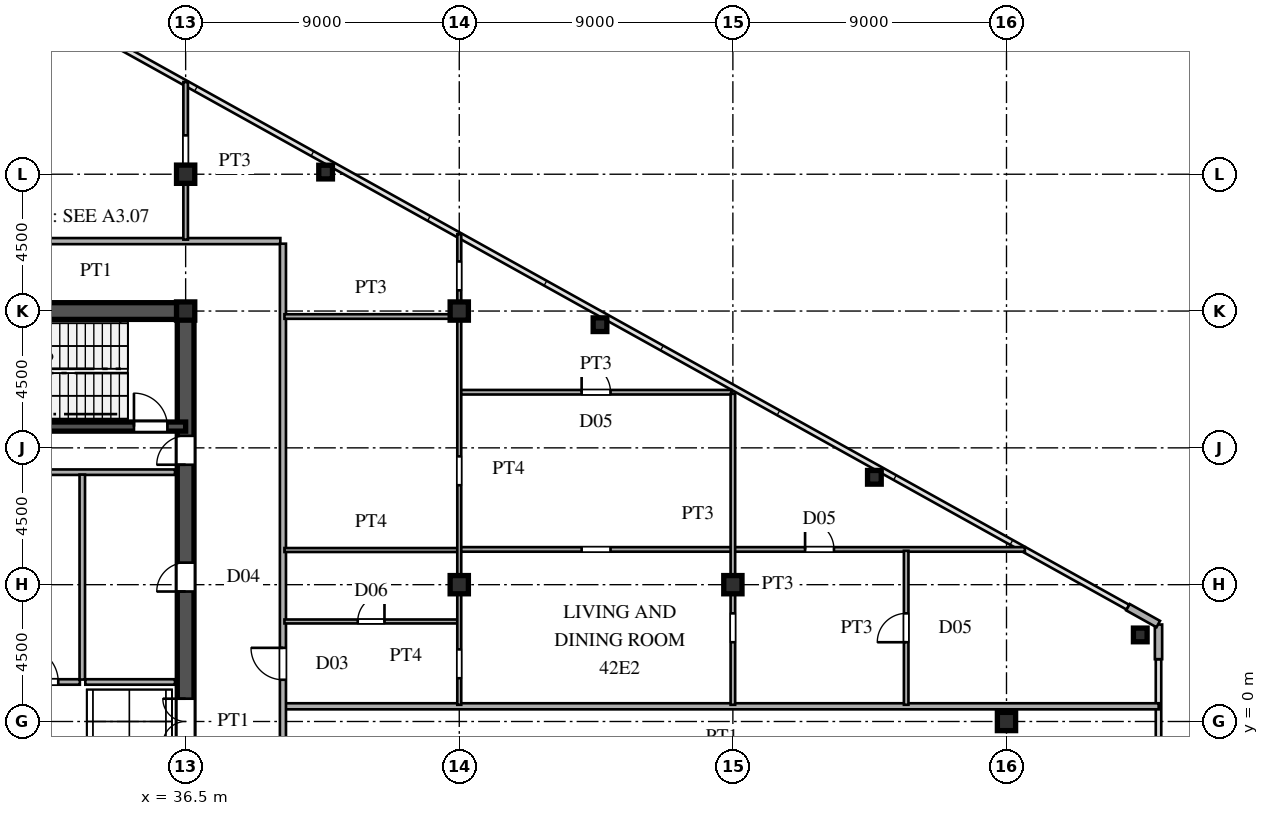
"""IFC4 building model, lengths in metres.
Left out: names, types, materials, properties, quantities, classifications, styles, units other than length and angle.
Written with IfcOpenShell. Run it as: python <this file> out.ifc"""

import sys

from ifc_helpers import new_model, si_unit, direction, frame, frame_2d, origin, origin_2d, place, context, subcontext, project, spatial, rectangle, hollow_rectangle, i_section, extrude, source, transform, mapped, element, fill, save


model = new_model("IFC4")
c1 = context("Model", 3, precision=1e-05, world=origin(), true_north=direction((0.0, 1.0)))
c2 = subcontext(c1, "Body", "Model", "MODEL_VIEW")
j1 = project(units=[si_unit("LENGTHUNIT", "METRE"), si_unit("PLANEANGLEUNIT", "RADIAN")], contexts=[c1])
p1 = place(None, origin())
s1 = spatial("IfcSite", under=j1, at=p1, CompositionType="ELEMENT")
p2 = place(p1, origin())
s2 = spatial("IfcBuilding", under=s1, at=p2, CompositionType="ELEMENT")
p3 = place(p2, frame((0.0, 0.0, 158.4)))
s3 = spatial("IfcBuildingStorey", under=s2, at=p3, CompositionType="ELEMENT", Elevation=158.4)
m1 = source(origin(), c2, "Body", "SweptSolid", [
    extrude(i_section(OverallWidth=0.6, OverallDepth=0.6, WebThickness=0.025, FlangeThickness=0.04, at=origin_2d()), origin(), (0.0, 0.0, 1.0), 3.6),
])
for number, where, z_axis, x_axis in (
    (1, (36.5, 13.5, 0.0), (0.0, 0.0, 1.0), (1.0, 0.0, 0.0)),
    (2, (36.5, 18.0, 0.0), (0.0, 0.0, 1.0), (1.0, 0.0, 0.0)),
    (3, (45.5, 4.5, 0.0), (0.0, 0.0, 1.0), (1.0, 0.0, 0.0)),
    (4, (45.5, 13.5, 0.0), (0.0, 0.0, 1.0), (1.0, 0.0, 0.0)),
    (5, (54.5, 4.5, 0.0), (0.0, 0.0, 1.0), (1.0, 0.0, 0.0)),
    (6, (63.5, 0.0, 0.0), (0.0, 0.0, 1.0), (1.0, 0.0, 0.0)),
):
    element("IfcColumn", number, at=place(p3, frame(where, z_axis=z_axis, x_axis=x_axis)), inside=s3, PredefinedType="COLUMN", context=c2, shape_type="MappedRepresentation", body=[
        mapped(m1, transform((0.0, 0.0, 0.0), scale=1.0)),
    ])
m2 = source(origin(), c2, "Body", "SweptSolid", [
    extrude(hollow_rectangle(XDim=0.45, YDim=0.45, WallThickness=0.018, at=origin_2d()), origin(), (0.0, 0.0, 1.0), 3.6),
])
for number, where, z_axis, x_axis in (
    (7, (67.9, 2.847, 0.0), (0.0, 0.0, 1.0), (1.0, 0.0, 0.0)),
    (8, (41.104, 18.071, 0.0), (0.0, 0.0, 1.0), (1.0, 0.0, 0.0)),
    (9, (50.129, 13.051, 0.0), (0.0, 0.0, 1.0), (1.0, 0.0, 0.0)),
    (10, (59.155, 8.031, 0.0), (0.0, 0.0, 1.0), (1.0, 0.0, 0.0)),
):
    element("IfcColumn", number, at=place(p3, frame(where, z_axis=z_axis, x_axis=x_axis)), inside=s3, PredefinedType="COLUMN", context=c2, shape_type="MappedRepresentation", body=[
        mapped(m2, transform((0.0, 0.0, 0.0), scale=1.0)),
    ])
for number, where, z_axis, x_axis in (
    (11, (68.5, 2.05, 0.0), (0.0, 0.0, 1.0), (0.0, 1.0, 0.0)),
    (12, (68.491, 3.205, 0.0), (0.0, 0.0, 1.0), (-0.874, 0.486, 0.0)),
):
    element("IfcWall", number, at=place(p3, frame(where, z_axis=z_axis, x_axis=x_axis)), inside=s3, PredefinedType="SOLIDWALL", context=c2, shape_type="SweptSolid", body=[
        extrude(rectangle(XDim=1.14, YDim=0.24, at=frame_2d((0.57, 0.0))), origin(), (0.0, 0.0, 1.0), 3.34),
    ])
p4 = place(p3, frame((27.5, 13.5, 0.0), z_axis=(0.0, 0.0, 1.0), x_axis=(1.0, 0.0, 0.0)))
e13 = element("IfcWall", 13, at=p4, inside=s3, PredefinedType="SHEAR", context=c2, shape_type="SweptSolid", body=[
    extrude(rectangle(XDim=9.0, YDim=0.55, at=frame_2d((4.5, 0.0))), origin(), (0.0, 0.0, 1.0), 3.34),
])
p5 = place(p3, frame((36.5, -1.3, 0.0), z_axis=(0.0, 0.0, 1.0), x_axis=(0.0, 1.0, 0.0)))
e14 = element("IfcWall", 14, at=p5, inside=s3, PredefinedType="SHEAR", context=c2, shape_type="SweptSolid", body=[
    extrude(rectangle(XDim=2.6, YDim=0.55, at=frame_2d((1.3, 0.0))), origin(), (0.0, 0.0, 1.0), 3.34),
])
p6 = place(p5, frame((0.55, 0.0, 0.0)))
e15 = element("IfcOpeningElement", 15, at=p6, cuts=e14, PredefinedType="OPENING", context=c2, shape_type="SweptSolid", body=[
    extrude(rectangle(XDim=1.5, YDim=2.3, at=frame_2d((0.75, 1.15))), frame((0.0, 0.285, 0.0), z_axis=(0.0, -1.0, 0.0), x_axis=(1.0, 0.0, 0.0)), (0.0, 0.0, 1.0), 0.57),
])
p7 = place(p3, frame((36.5, 8.2, 0.0), z_axis=(0.0, 0.0, 1.0), x_axis=(0.0, 1.0, 0.0)))
e16 = element("IfcWall", 16, at=p7, inside=s3, PredefinedType="SHEAR", context=c2, shape_type="SweptSolid", body=[
    extrude(rectangle(XDim=5.45, YDim=0.55, at=frame_2d((2.725, 0.0))), origin(), (0.0, 0.0, 1.0), 3.34),
])
p8 = place(p7, frame((0.245, 0.0, 0.0)))
e17 = element("IfcOpeningElement", 17, at=p8, cuts=e16, PredefinedType="OPENING", context=c2, shape_type="SweptSolid", body=[
    extrude(rectangle(XDim=0.95, YDim=2.15, at=frame_2d((0.475, 1.075))), frame((0.0, 0.285, 0.0), z_axis=(0.0, -1.0, 0.0), x_axis=(1.0, 0.0, 0.0)), (0.0, 0.0, 1.0), 0.57),
])
p9 = place(p3, frame((36.5, 1.3, 0.0), z_axis=(0.0, 0.0, 1.0), x_axis=(0.0, 1.0, 0.0)))
e18 = element("IfcWall", 18, at=p9, inside=s3, PredefinedType="SHEAR", context=c2, shape_type="SweptSolid", body=[
    extrude(rectangle(XDim=6.9, YDim=0.55, at=frame_2d((3.45, 0.0))), origin(), (0.0, 0.0, 1.0), 3.34),
])
p10 = place(p9, frame((2.975, 0.0, 0.0)))
e19 = element("IfcOpeningElement", 19, at=p10, cuts=e18, PredefinedType="OPENING", context=c2, shape_type="SweptSolid", body=[
    extrude(rectangle(XDim=0.95, YDim=2.15, at=frame_2d((0.475, 1.075))), frame((0.0, 0.285, 0.0), z_axis=(0.0, -1.0, 0.0), x_axis=(1.0, 0.0, 0.0)), (0.0, 0.0, 1.0), 0.57),
])
p11 = place(p3, frame((27.5, 9.7, 0.0), z_axis=(0.0, 0.0, 1.0), x_axis=(1.0, 0.0, 0.0)))
e20 = element("IfcWall", 20, at=p11, inside=s3, PredefinedType="SHEAR", context=c2, shape_type="SweptSolid", body=[
    extrude(rectangle(XDim=9.0, YDim=0.3, at=frame_2d((4.5, 0.0))), origin(), (0.0, 0.0, 1.0), 3.34),
])
p12 = place(p11, frame((7.3, 0.0, 0.0)))
e21 = element("IfcOpeningElement", 21, at=p12, cuts=e20, PredefinedType="OPENING", context=c2, shape_type="SweptSolid", body=[
    extrude(rectangle(XDim=1.1, YDim=2.2, at=frame_2d((0.55, 1.1))), frame((0.0, 0.16, 0.0), z_axis=(0.0, -1.0, 0.0), x_axis=(1.0, 0.0, 0.0)), (0.0, 0.0, 1.0), 0.32),
])
p13 = place(p3, frame((30.45, 8.2, 0.0), z_axis=(0.0, 0.0, 1.0), x_axis=(1.0, 0.0, 0.0)))
e22 = element("IfcWall", 22, at=p13, inside=s3, PredefinedType="PARTITIONING", context=c2, shape_type="SweptSolid", body=[
    extrude(rectangle(XDim=5.7, YDim=0.18, at=frame_2d((2.85, 0.0))), origin(), (0.0, 0.0, 1.0), 3.34),
])
p14 = place(p3, frame((33.1, 1.38, 0.0), z_axis=(0.0, 0.0, 1.0), x_axis=(0.0, 1.0, 0.0)))
e23 = element("IfcWall", 23, at=p14, inside=s3, PredefinedType="PARTITIONING", context=c2, shape_type="SweptSolid", body=[
    extrude(rectangle(XDim=6.74, YDim=0.18, at=frame_2d((3.37, 0.0))), origin(), (0.0, 0.0, 1.0), 3.34),
])
p15 = place(p3, frame((30.45, 1.3, 0.0), z_axis=(0.0, 0.0, 1.0), x_axis=(1.0, 0.0, 0.0)))
e24 = element("IfcWall", 24, at=p15, inside=s3, PredefinedType="PARTITIONING", context=c2, shape_type="SweptSolid", body=[
    extrude(rectangle(XDim=2.57, YDim=0.18, at=frame_2d((1.285, 0.0))), origin(), (0.0, 0.0, 1.0), 3.34),
])
p16 = place(p15, frame((0.71, 0.0, 0.0)))
e25 = element("IfcOpeningElement", 25, at=p16, cuts=e24, PredefinedType="OPENING", context=c2, shape_type="SweptSolid", body=[
    extrude(rectangle(XDim=1.15, YDim=2.2, at=frame_2d((0.575, 1.1))), frame((0.0, 0.1, 0.0), z_axis=(0.0, -1.0, 0.0), x_axis=(1.0, 0.0, 0.0)), (0.0, 0.0, 1.0), 0.2),
])
p17 = place(p3, frame((33.2, 1.3, 0.0), z_axis=(0.0, 0.0, 1.0), x_axis=(1.0, 0.0, 0.0)))
e26 = element("IfcWall", 26, at=p17, inside=s3, PredefinedType="PARTITIONING", context=c2, shape_type="SweptSolid", body=[
    extrude(rectangle(XDim=2.95, YDim=0.18, at=frame_2d((1.475, 0.0))), origin(), (0.0, 0.0, 1.0), 3.34),
])
p18 = place(p3, frame((39.78, 0.5, 0.0), z_axis=(0.0, 0.0, 1.0), x_axis=(1.0, 0.0, 0.0)))
e27 = element("IfcWall", 27, at=p18, inside=s3, PredefinedType="PARTITIONING", context=c2, shape_type="SweptSolid", body=[
    extrude(rectangle(XDim=28.725, YDim=0.2, at=frame_2d((14.362, 0.0))), origin(), (0.0, 0.0, 1.0), 3.34),
])
p19 = place(p3, frame((39.75, 3.29, 0.0), z_axis=(0.0, 0.0, 1.0), x_axis=(1.0, 0.0, 0.0)))
e28 = element("IfcWall", 28, at=p19, inside=s3, PredefinedType="PARTITIONING", context=c2, shape_type="SweptSolid", body=[
    extrude(rectangle(XDim=5.7, YDim=0.13, at=frame_2d((2.85, 0.0))), origin(), (0.0, 0.0, 1.0), 3.34),
])
p20 = place(p19, frame((2.41, 0.0, 0.0)))
e29 = element("IfcOpeningElement", 29, at=p20, cuts=e28, PredefinedType="OPENING", context=c2, shape_type="SweptSolid", body=[
    extrude(rectangle(XDim=0.88, YDim=2.1, at=frame_2d((0.44, 1.05))), frame((0.0, 0.075, 0.0), z_axis=(0.0, -1.0, 0.0), x_axis=(1.0, 0.0, 0.0)), (0.0, 0.0, 1.0), 0.15),
])
p21 = place(p3, frame((39.75, 5.64, 0.0), z_axis=(0.0, 0.0, 1.0), x_axis=(1.0, 0.0, 0.0)))
e30 = element("IfcWall", 30, at=p21, inside=s3, PredefinedType="PARTITIONING", context=c2, shape_type="SweptSolid", body=[
    extrude(rectangle(XDim=5.7, YDim=0.13, at=frame_2d((2.85, 0.0))), origin(), (0.0, 0.0, 1.0), 3.34),
])
p22 = place(p3, frame((45.55, 5.66, 0.0), z_axis=(0.0, 0.0, 1.0), x_axis=(1.0, 0.0, 0.0)))
e31 = element("IfcWall", 31, at=p22, inside=s3, PredefinedType="PARTITIONING", context=c2, shape_type="SweptSolid", body=[
    extrude(rectangle(XDim=18.555, YDim=0.15, at=frame_2d((9.277, 0.0))), origin(), (0.0, 0.0, 1.0), 3.34),
])
p23 = place(p22, frame((3.975, 0.0, 0.0)))
e32 = element("IfcOpeningElement", 32, at=p23, cuts=e31, PredefinedType="OPENING", context=c2, shape_type="SweptSolid", body=[
    extrude(rectangle(XDim=0.95, YDim=2.15, at=frame_2d((0.475, 1.075))), frame((0.0, 0.085, 0.0), z_axis=(0.0, -1.0, 0.0), x_axis=(1.0, 0.0, 0.0)), (0.0, 0.0, 1.0), 0.17),
])
p24 = place(p22, frame((11.325, 0.0, 0.0)))
e33 = element("IfcOpeningElement", 33, at=p24, cuts=e31, PredefinedType="OPENING", context=c2, shape_type="SweptSolid", body=[
    extrude(rectangle(XDim=0.95, YDim=2.15, at=frame_2d((0.475, 1.075))), frame((0.0, 0.085, 0.0), z_axis=(0.0, -1.0, 0.0), x_axis=(1.0, 0.0, 0.0)), (0.0, 0.0, 1.0), 0.17),
])
p25 = place(p3, frame((45.55, 10.83, 0.0), z_axis=(0.0, 0.0, 1.0), x_axis=(1.0, 0.0, 0.0)))
e34 = element("IfcWall", 34, at=p25, inside=s3, PredefinedType="PARTITIONING", context=c2, shape_type="SweptSolid", body=[
    extrude(rectangle(XDim=8.9, YDim=0.15, at=frame_2d((4.45, 0.0))), origin(), (0.0, 0.0, 1.0), 3.34),
])
p26 = place(p25, frame((3.975, 0.0, 0.0)))
e35 = element("IfcOpeningElement", 35, at=p26, cuts=e34, PredefinedType="OPENING", context=c2, shape_type="SweptSolid", body=[
    extrude(rectangle(XDim=0.95, YDim=2.15, at=frame_2d((0.475, 1.075))), frame((0.0, 0.085, 0.0), z_axis=(0.0, -1.0, 0.0), x_axis=(1.0, 0.0, 0.0)), (0.0, 0.0, 1.0), 0.17),
])
p27 = place(p3, frame((39.75, 13.32, 0.0), z_axis=(0.0, 0.0, 1.0), x_axis=(1.0, 0.0, 0.0)))
e36 = element("IfcWall", 36, at=p27, inside=s3, PredefinedType="PARTITIONING", context=c2, shape_type="SweptSolid", body=[
    extrude(rectangle(XDim=5.7, YDim=0.15, at=frame_2d((2.85, 0.0))), origin(), (0.0, 0.0, 1.0), 3.34),
])
p28 = place(p3, frame((27.5, 15.8, 0.0), z_axis=(0.0, 0.0, 1.0), x_axis=(1.0, 0.0, 0.0)))
e37 = element("IfcWall", 37, at=p28, inside=s3, PredefinedType="PARTITIONING", context=c2, shape_type="SweptSolid", body=[
    extrude(rectangle(XDim=12.115, YDim=0.2, at=frame_2d((6.058, 0.0))), origin(), (0.0, 0.0, 1.0), 3.34),
])
p29 = place(p3, frame((36.5, 15.85, 0.0), z_axis=(0.0, 0.0, 1.0), x_axis=(0.0, 1.0, 0.0)))
e38 = element("IfcWall", 38, at=p29, inside=s3, PredefinedType="PARTITIONING", context=c2, shape_type="SweptSolid", body=[
    extrude(rectangle(XDim=2.17, YDim=0.15, at=frame_2d((1.085, 0.0))), origin(), (0.0, 0.0, 1.0), 2.44),
])
p30 = place(p3, frame((36.5, 18.02, 0.0), z_axis=(0.0, 0.0, 1.0), x_axis=(0.0, 1.0, 0.0)))
e39 = element("IfcWall", 39, at=p30, inside=s3, PredefinedType="PARTITIONING", context=c2, shape_type="SweptSolid", body=[
    extrude(rectangle(XDim=3.012, YDim=0.15, at=frame_2d((1.506, 0.0))), origin(), (0.0, 0.0, 1.0), 3.34),
])
p31 = place(p30, frame((0.308, 0.0, 0.0)))
e40 = element("IfcOpeningElement", 40, at=p31, cuts=e39, PredefinedType="OPENING", context=c2, shape_type="SweptSolid", body=[
    extrude(rectangle(XDim=0.95, YDim=2.15, at=frame_2d((0.475, 1.075))), frame((0.0, 0.085, 0.0), z_axis=(0.0, -1.0, 0.0), x_axis=(1.0, 0.0, 0.0)), (0.0, 0.0, 1.0), 0.17),
])
p32 = place(p3, frame((39.7, -15.715, 0.0), z_axis=(0.0, 0.0, 1.0), x_axis=(0.0, 1.0, 0.0)))
e41 = element("IfcWall", 41, at=p32, inside=s3, PredefinedType="PARTITIONING", context=c2, shape_type="SweptSolid", body=[
    extrude(rectangle(XDim=31.43, YDim=0.2, at=frame_2d((15.715, 0.0))), origin(), (0.0, 0.0, 1.0), 3.34),
])
p33 = place(p32, frame((7.54, 0.0, 0.0)))
e42 = element("IfcOpeningElement", 42, at=p33, cuts=e41, PredefinedType="OPENING", context=c2, shape_type="SweptSolid", body=[
    extrude(rectangle(XDim=1.05, YDim=2.25, at=frame_2d((0.525, 1.125))), frame((0.0, 0.11, 0.0), z_axis=(0.0, -1.0, 0.0), x_axis=(1.0, 0.0, 0.0)), (0.0, 0.0, 1.0), 0.22),
])
p34 = place(p32, frame((17.087, 0.0, 0.0)))
e43 = element("IfcOpeningElement", 43, at=p34, cuts=e41, PredefinedType="OPENING", context=c2, shape_type="SweptSolid", body=[
    extrude(rectangle(XDim=1.05, YDim=2.25, at=frame_2d((0.525, 1.125))), frame((0.0, 0.11, 0.0), z_axis=(0.0, -1.0, 0.0), x_axis=(1.0, 0.0, 0.0)), (0.0, 0.0, 1.0), 0.22),
])
p35 = place(p3, frame((45.5, 0.55, 0.0), z_axis=(0.0, 0.0, 1.0), x_axis=(0.0, 1.0, 0.0)))
e44 = element("IfcWall", 44, at=p35, inside=s3, PredefinedType="PARTITIONING", context=c2, shape_type="SweptSolid", body=[
    extrude(rectangle(XDim=12.97, YDim=0.13, at=frame_2d((6.485, 0.0))), origin(), (0.0, 0.0, 1.0), 2.44),
])
p36 = place(p35, frame((0.873, 0.0, 0.0)))
e45 = element("IfcOpeningElement", 45, at=p36, cuts=e44, PredefinedType="OPENING", context=c2, shape_type="SweptSolid", body=[
    extrude(rectangle(XDim=0.95, YDim=2.15, at=frame_2d((0.475, 1.075))), frame((0.0, 0.075, 0.0), z_axis=(0.0, -1.0, 0.0), x_axis=(1.0, 0.0, 0.0)), (0.0, 0.0, 1.0), 0.15),
])
p37 = place(p35, frame((7.221, 0.0, 0.0)))
e46 = element("IfcOpeningElement", 46, at=p37, cuts=e44, PredefinedType="OPENING", context=c2, shape_type="SweptSolid", body=[
    extrude(rectangle(XDim=0.95, YDim=2.15, at=frame_2d((0.475, 1.075))), frame((0.0, 0.075, 0.0), z_axis=(0.0, -1.0, 0.0), x_axis=(1.0, 0.0, 0.0)), (0.0, 0.0, 1.0), 0.15),
])
p38 = place(p3, frame((45.5, 13.52, 0.0), z_axis=(0.0, 0.0, 1.0), x_axis=(0.0, 1.0, 0.0)))
e47 = element("IfcWall", 47, at=p38, inside=s3, PredefinedType="PARTITIONING", context=c2, shape_type="SweptSolid", body=[
    extrude(rectangle(XDim=2.507, YDim=0.13, at=frame_2d((1.253, 0.0))), origin(), (0.0, 0.0, 1.0), 3.34),
])
p39 = place(p38, frame((0.661, 0.0, 0.0)))
e48 = element("IfcOpeningElement", 48, at=p39, cuts=e47, PredefinedType="OPENING", context=c2, shape_type="SweptSolid", body=[
    extrude(rectangle(XDim=0.95, YDim=2.15, at=frame_2d((0.475, 1.075))), frame((0.0, 0.075, 0.0), z_axis=(0.0, -1.0, 0.0), x_axis=(1.0, 0.0, 0.0)), (0.0, 0.0, 1.0), 0.15),
])
p40 = place(p3, frame((54.5, 0.55, 0.0), z_axis=(0.0, 0.0, 1.0), x_axis=(0.0, 1.0, 0.0)))
e49 = element("IfcWall", 49, at=p40, inside=s3, PredefinedType="PARTITIONING", context=c2, shape_type="SweptSolid", body=[
    extrude(rectangle(XDim=3.97, YDim=0.15, at=frame_2d((1.985, 0.0))), origin(), (0.0, 0.0, 1.0), 2.44),
])
p41 = place(p40, frame((2.057, 0.0, 0.0)))
e50 = element("IfcOpeningElement", 50, at=p41, cuts=e49, PredefinedType="OPENING", context=c2, shape_type="SweptSolid", body=[
    extrude(rectangle(XDim=0.95, YDim=2.15, at=frame_2d((0.475, 1.075))), frame((0.0, 0.085, 0.0), z_axis=(0.0, -1.0, 0.0), x_axis=(1.0, 0.0, 0.0)), (0.0, 0.0, 1.0), 0.17),
])
p42 = place(p3, frame((54.5, 4.52, 0.0), z_axis=(0.0, 0.0, 1.0), x_axis=(0.0, 1.0, 0.0)))
e51 = element("IfcWall", 51, at=p42, inside=s3, PredefinedType="PARTITIONING", context=c2, shape_type="SweptSolid", body=[
    extrude(rectangle(XDim=6.258, YDim=0.15, at=frame_2d((3.129, 0.0))), origin(), (0.0, 0.0, 1.0), 3.34),
])
p43 = place(p3, frame((60.2, 0.55, 0.0), z_axis=(0.0, 0.0, 1.0), x_axis=(0.0, 1.0, 0.0)))
e52 = element("IfcWall", 52, at=p43, inside=s3, PredefinedType="PARTITIONING", context=c2, shape_type="SweptSolid", body=[
    extrude(rectangle(XDim=5.064, YDim=0.15, at=frame_2d((2.532, 0.0))), origin(), (0.0, 0.0, 1.0), 3.34),
])
p44 = place(p43, frame((2.057, 0.0, 0.0)))
e53 = element("IfcOpeningElement", 53, at=p44, cuts=e52, PredefinedType="OPENING", context=c2, shape_type="SweptSolid", body=[
    extrude(rectangle(XDim=0.95, YDim=2.15, at=frame_2d((0.475, 1.075))), frame((0.0, 0.085, 0.0), z_axis=(0.0, -1.0, 0.0), x_axis=(1.0, 0.0, 0.0)), (0.0, 0.0, 1.0), 0.17),
])
m3 = source(origin(), c2, "Body", "SweptSolid", [
    extrude(rectangle(XDim=1.5, YDim=2.3, at=frame_2d((0.75, 1.15))), frame((0.0, 0.025, 0.0), z_axis=(0.0, -1.0, 0.0), x_axis=(1.0, 0.0, 0.0)), (0.0, 0.0, 1.0), 0.05),
])
p45 = place(p6, origin())
e54 = element("IfcDoor", 54, at=p45, inside=s3, OperationType="DOUBLE_SWING_LEFT", PredefinedType="DOOR", context=c2, shape_type="MappedRepresentation", body=[
    mapped(m3, transform((0.0, 0.0, 0.0), scale=1.0)),
])
fill(e15, e54)
m4 = source(origin(), c2, "Body", "SweptSolid", [
    extrude(rectangle(XDim=0.95, YDim=2.15, at=frame_2d((0.475, 1.075))), frame((0.0, 0.025, 0.0), z_axis=(0.0, -1.0, 0.0), x_axis=(1.0, 0.0, 0.0)), (0.0, 0.0, 1.0), 0.05),
])
p46 = place(p8, origin())
e55 = element("IfcDoor", 55, at=p46, inside=s3, OperationType="SINGLE_SWING_LEFT", PredefinedType="DOOR", context=c2, shape_type="MappedRepresentation", body=[
    mapped(m4, transform((0.0, 0.0, 0.0), scale=1.0)),
])
fill(e17, e55)
p47 = place(p10, origin())
e56 = element("IfcDoor", 56, at=p47, inside=s3, OperationType="SINGLE_SWING_LEFT", PredefinedType="DOOR", context=c2, shape_type="MappedRepresentation", body=[
    mapped(m4, transform((0.0, 0.0, 0.0), scale=1.0)),
])
fill(e19, e56)
m5 = source(origin(), c2, "Body", "SweptSolid", [
    extrude(rectangle(XDim=1.1, YDim=2.2, at=frame_2d((0.55, 1.1))), frame((0.0, 0.025, 0.0), z_axis=(0.0, -1.0, 0.0), x_axis=(1.0, 0.0, 0.0)), (0.0, 0.0, 1.0), 0.05),
])
p48 = place(p12, origin())
e57 = element("IfcDoor", 57, at=p48, inside=s3, OperationType="SINGLE_SWING_LEFT", PredefinedType="DOOR", context=c2, shape_type="MappedRepresentation", body=[
    mapped(m5, transform((0.0, 0.0, 0.0), scale=1.0)),
])
fill(e21, e57)
m6 = source(origin(), c2, "Body", "SweptSolid", [
    extrude(rectangle(XDim=1.15, YDim=2.2, at=frame_2d((0.575, 1.1))), frame((0.0, 0.025, 0.0), z_axis=(0.0, -1.0, 0.0), x_axis=(1.0, 0.0, 0.0)), (0.0, 0.0, 1.0), 0.05),
])
p49 = place(p16, origin())
e58 = element("IfcDoor", 58, at=p49, inside=s3, OperationType="SINGLE_SWING_LEFT", PredefinedType="DOOR", context=c2, shape_type="MappedRepresentation", body=[
    mapped(m6, transform((0.0, 0.0, 0.0), scale=1.0)),
])
fill(e25, e58)
m7 = source(origin(), c2, "Body", "SweptSolid", [
    extrude(rectangle(XDim=0.88, YDim=2.1, at=frame_2d((0.44, 1.05))), frame((0.0, 0.025, 0.0), z_axis=(0.0, -1.0, 0.0), x_axis=(1.0, 0.0, 0.0)), (0.0, 0.0, 1.0), 0.05),
])
p50 = place(p20, origin())
e59 = element("IfcDoor", 59, at=p50, inside=s3, OperationType="SINGLE_SWING_RIGHT", PredefinedType="DOOR", context=c2, shape_type="MappedRepresentation", body=[
    mapped(m7, transform((0.0, 0.0, 0.0), scale=1.0)),
])
fill(e29, e59)
m8 = source(origin(), c2, "Body", "SweptSolid", [
    extrude(rectangle(XDim=0.95, YDim=2.15, at=frame_2d((0.475, 1.075))), frame((0.0, 0.025, 0.0), z_axis=(0.0, -1.0, 0.0), x_axis=(1.0, 0.0, 0.0)), (0.0, 0.0, 1.0), 0.05),
])
p51 = place(p24, origin())
e60 = element("IfcDoor", 60, at=p51, inside=s3, OperationType="SINGLE_SWING_LEFT", PredefinedType="DOOR", context=c2, shape_type="MappedRepresentation", body=[
    mapped(m8, transform((0.0, 0.0, 0.0), scale=1.0)),
])
fill(e33, e60)
p52 = place(p26, origin())
e61 = element("IfcDoor", 61, at=p52, inside=s3, OperationType="SINGLE_SWING_LEFT", PredefinedType="DOOR", context=c2, shape_type="MappedRepresentation", body=[
    mapped(m8, transform((0.0, 0.0, 0.0), scale=1.0)),
])
fill(e35, e61)
m9 = source(origin(), c2, "Body", "SweptSolid", [
    extrude(rectangle(XDim=1.05, YDim=2.25, at=frame_2d((0.525, 1.125))), frame((0.0, 0.025, 0.0), z_axis=(0.0, -1.0, 0.0), x_axis=(1.0, 0.0, 0.0)), (0.0, 0.0, 1.0), 0.05),
])
p53 = place(p34, origin())
e62 = element("IfcDoor", 62, at=p53, inside=s3, OperationType="SINGLE_SWING_RIGHT", PredefinedType="DOOR", context=c2, shape_type="MappedRepresentation", body=[
    mapped(m9, transform((0.0, 0.0, 0.0), scale=1.0)),
])
fill(e43, e62)
p54 = place(p44, origin())
e63 = element("IfcDoor", 63, at=p54, inside=s3, OperationType="SINGLE_SWING_LEFT", PredefinedType="DOOR", context=c2, shape_type="MappedRepresentation", body=[
    mapped(m8, transform((0.0, 0.0, 0.0), scale=1.0)),
])
fill(e53, e63)
save(model, sys.argv[1])
